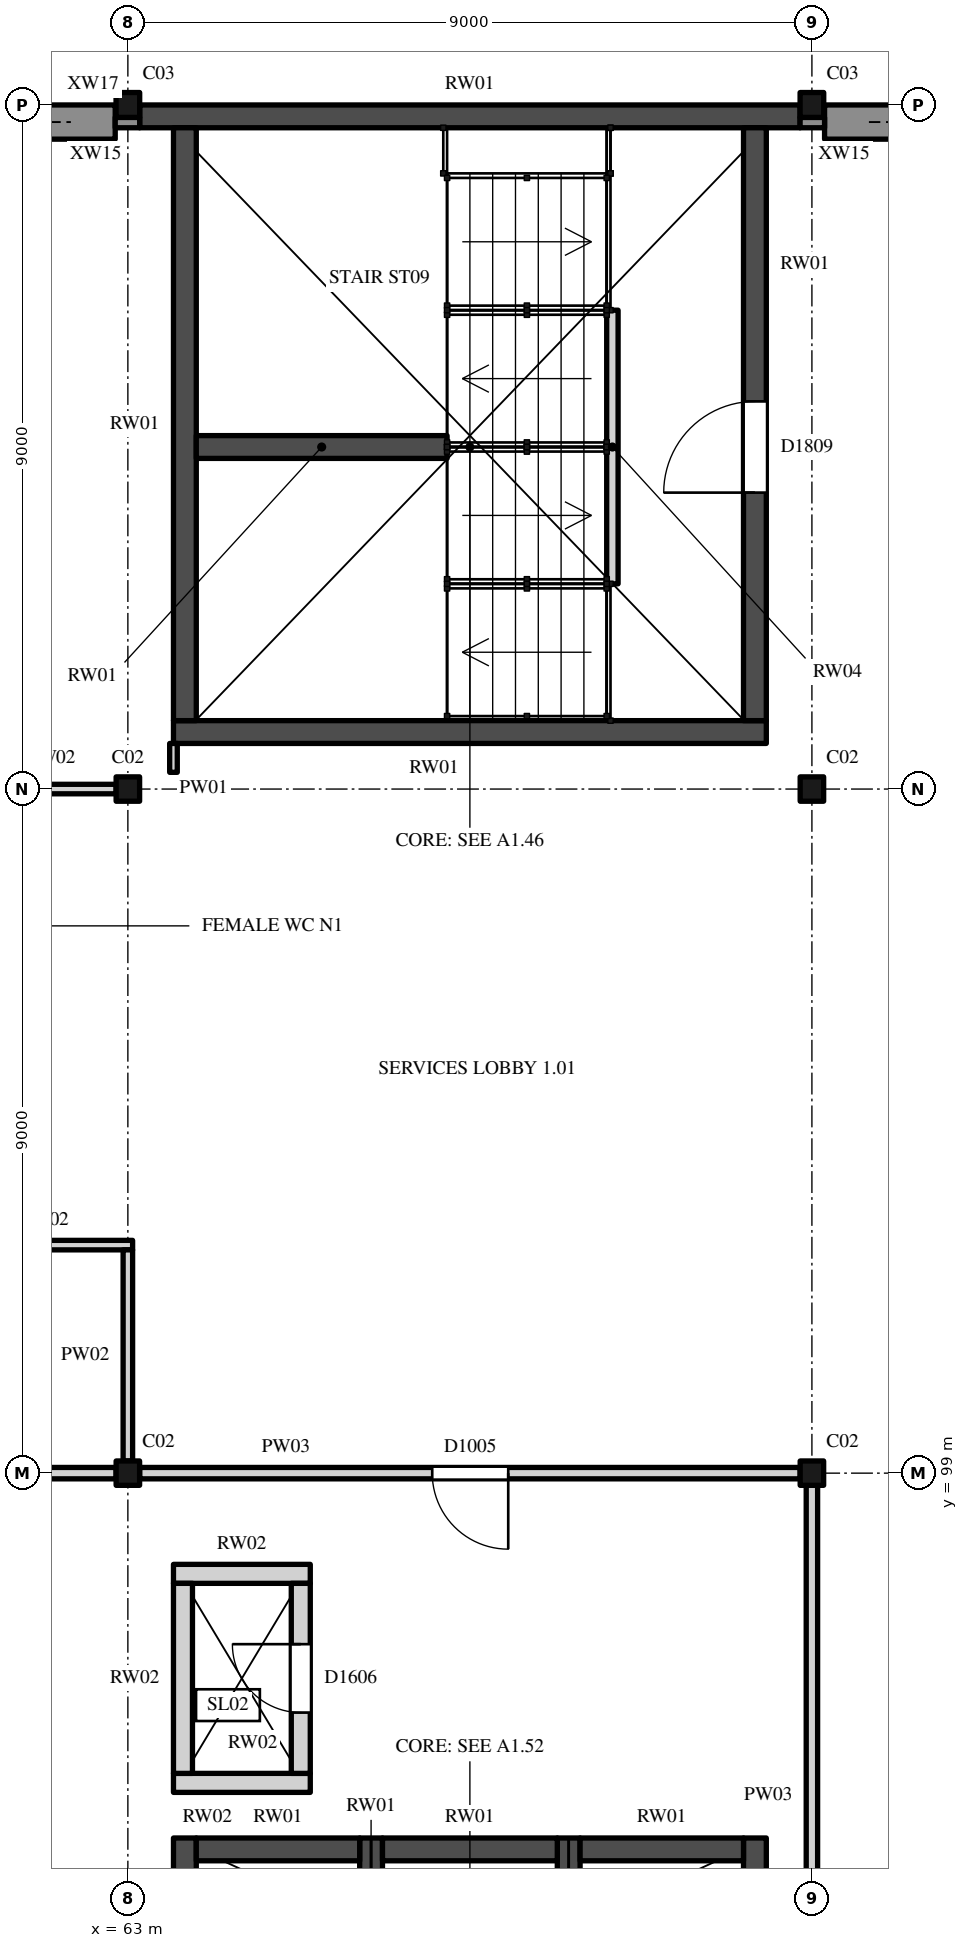
"""IFC4 building model, lengths in metres.
Left out: names, types, materials, properties, quantities, classifications, styles, units other than length and angle.
Written with IfcOpenShell. Run it as: python <this file> out.ifc"""

import sys

from ifc_helpers import new_model, si_unit, direction, frame, frame_2d, origin, origin_2d, place, context, subcontext, project, spatial, rectangle, i_section, extrude, element, fill, save


model = new_model("IFC4")
c1 = context("Model", 3, precision=1e-05, world=origin(), true_north=direction((0.0, 1.0)))
c2 = subcontext(c1, "Body", "Model", "MODEL_VIEW")
j1 = project(units=[si_unit("LENGTHUNIT", "METRE"), si_unit("PLANEANGLEUNIT", "RADIAN")], contexts=[c1])
p1 = place(None, origin())
s1 = spatial("IfcSite", under=j1, at=p1, CompositionType="ELEMENT")
p2 = place(p1, origin())
s2 = spatial("IfcBuilding", under=s1, at=p2, CompositionType="ELEMENT")
p3 = place(p2, frame((0.0, 0.0, 6.0)))
s3 = spatial("IfcBuildingStorey", under=s2, at=p3, CompositionType="ELEMENT", Elevation=6.0)
for number, where, z_axis, x_axis in (
    (1, (63.0, 99.0, 0.0), (0.0, 0.0, 1.0), (1.0, 0.0, 0.0)),
    (2, (72.0, 99.0, 0.0), (0.0, 0.0, 1.0), (1.0, 0.0, 0.0)),
    (3, (63.0, 108.0, 0.0), (0.0, 0.0, 1.0), (1.0, 0.0, 0.0)),
    (4, (72.0, 108.0, 0.0), (0.0, 0.0, 1.0), (1.0, 0.0, 0.0)),
):
    element("IfcColumn", number, at=place(p3, frame(where, z_axis=z_axis, x_axis=x_axis)), inside=s3, PredefinedType="COLUMN", context=c2, shape_type="SweptSolid", body=[
        extrude(i_section(OverallWidth=0.309, OverallDepth=0.321, WebThickness=0.014, FlangeThickness=0.022, FilletRadius=0.017, at=origin_2d()), origin(), (0.0, 0.0, 1.0), 5.0),
    ])
for number, where, z_axis, x_axis in (
    (5, (63.0, 117.0, 0.0), (0.0, 0.0, 1.0), (1.0, 0.0, 0.0)),
    (6, (72.0, 117.0, 0.0), (0.0, 0.0, 1.0), (1.0, 0.0, 0.0)),
):
    element("IfcColumn", number, at=place(p3, frame(where, z_axis=z_axis, x_axis=x_axis)), inside=s3, PredefinedType="COLUMN", context=c2, shape_type="SweptSolid", body=[
        extrude(i_section(OverallWidth=0.311, OverallDepth=0.327, WebThickness=0.016, FlangeThickness=0.025, FilletRadius=0.017, at=origin_2d()), origin(), (0.0, 0.0, 1.0), 5.0),
    ])
p4 = place(p3, frame((63.6, 108.75, 0.0), z_axis=(0.0, 0.0, 1.0), x_axis=(1.0, 0.0, 0.0)))
e7 = element("IfcWall", 7, at=p4, inside=s3, PredefinedType="SHEAR", context=c2, shape_type="SweptSolid", body=[
    extrude(rectangle(XDim=7.8, YDim=0.3, at=frame_2d((3.9, 0.0))), origin(), (0.0, 0.0, 1.0), 5.0),
])
p5 = place(p3, frame((63.156, 116.85, 0.0), z_axis=(0.0, 0.0, 1.0), x_axis=(1.0, 0.0, 0.0)))
e8 = element("IfcWall", 8, at=p5, inside=s3, PredefinedType="SHEAR", context=c2, shape_type="SweptSolid", body=[
    extrude(rectangle(XDim=8.689, YDim=0.3, at=frame_2d((4.344, 0.0))), origin(), (0.0, 0.0, 1.0), 5.0),
])
p6 = place(p3, frame((63.75, 108.9, 0.0), z_axis=(0.0, 0.0, 1.0), x_axis=(0.0, 1.0, 0.0)))
e9 = element("IfcWall", 9, at=p6, inside=s3, PredefinedType="SHEAR", context=c2, shape_type="SweptSolid", body=[
    extrude(rectangle(XDim=7.8, YDim=0.3, at=frame_2d((3.9, 0.0))), origin(), (0.0, 0.0, 1.0), 5.0),
])
p7 = place(p3, frame((71.25, 108.9, 0.0), z_axis=(0.0, 0.0, 1.0), x_axis=(0.0, 1.0, 0.0)))
e10 = element("IfcWall", 10, at=p7, inside=s3, PredefinedType="SHEAR", context=c2, shape_type="SweptSolid", body=[
    extrude(rectangle(XDim=7.8, YDim=0.3, at=frame_2d((3.9, 0.0))), origin(), (0.0, 0.0, 1.0), 5.0),
])
p8 = place(p7, frame((3.0, 0.0, 0.0)))
e11 = element("IfcOpeningElement", 11, at=p8, cuts=e10, PredefinedType="OPENING", context=c2, shape_type="SweptSolid", body=[
    extrude(rectangle(XDim=1.2, YDim=2.1, at=frame_2d((0.6, 1.05))), frame((0.0, 0.16, 0.0), z_axis=(0.0, -1.0, 0.0), x_axis=(1.0, 0.0, 0.0)), (0.0, 0.0, 1.0), 0.32),
])
p9 = place(p3, frame((67.2, 112.5, 0.0), z_axis=(0.0, 0.0, 1.0), x_axis=(-1.0, 0.0, 0.0)))
e12 = element("IfcWall", 12, at=p9, inside=s3, PredefinedType="SHEAR", context=c2, shape_type="SweptSolid", body=[
    extrude(rectangle(XDim=3.3, YDim=0.3, at=frame_2d((1.65, 0.0))), origin(), (0.0, 0.0, 1.0), 5.0),
])
p10 = place(p3, frame((69.375, 110.7, 0.0), z_axis=(0.0, 0.0, 1.0), x_axis=(0.0, 1.0, 0.0)))
e13 = element("IfcWall", 13, at=p10, inside=s3, PredefinedType="STANDARD", context=c2, shape_type="SweptSolid", body=[
    extrude(rectangle(XDim=3.6, YDim=0.15, at=frame_2d((1.8, 0.0))), origin(), (0.0, 0.0, 1.0), 2.3),
])
for number, where, z_axis, x_axis in (
    (14, (63.75, 90.6, 0.0), (0.0, 0.0, 1.0), (0.0, 1.0, 0.0)),
    (15, (66.2, 90.6, 0.0), (0.0, 0.0, 1.0), (0.0, 1.0, 0.0)),
    (16, (68.8, 90.6, 0.0), (0.0, 0.0, 1.0), (0.0, 1.0, 0.0)),
    (17, (71.25, 90.6, 0.0), (0.0, 0.0, 1.0), (0.0, 1.0, 0.0)),
):
    element("IfcWall", number, at=place(p3, frame(where, z_axis=z_axis, x_axis=x_axis)), inside=s3, PredefinedType="SHEAR", context=c2, shape_type="SweptSolid", body=[
        extrude(rectangle(XDim=3.6, YDim=0.3, at=frame_2d((1.8, 0.0))), origin(), (0.0, 0.0, 1.0), 5.0),
    ])
p11 = place(p3, frame((63.9, 94.05, 0.0), z_axis=(0.0, 0.0, 1.0), x_axis=(1.0, 0.0, 0.0)))
e18 = element("IfcWall", 18, at=p11, inside=s3, PredefinedType="SHEAR", context=c2, shape_type="SweptSolid", body=[
    extrude(rectangle(XDim=2.15, YDim=0.3, at=frame_2d((1.075, 0.0))), origin(), (0.0, 0.0, 1.0), 5.0),
])
p12 = place(p3, frame((66.35, 94.05, 0.0), z_axis=(0.0, 0.0, 1.0), x_axis=(1.0, 0.0, 0.0)))
e19 = element("IfcWall", 19, at=p12, inside=s3, PredefinedType="SHEAR", context=c2, shape_type="SweptSolid", body=[
    extrude(rectangle(XDim=2.3, YDim=0.3, at=frame_2d((1.15, 0.0))), origin(), (0.0, 0.0, 1.0), 5.0),
])
p13 = place(p3, frame((68.95, 94.05, 0.0), z_axis=(0.0, 0.0, 1.0), x_axis=(1.0, 0.0, 0.0)))
e20 = element("IfcWall", 20, at=p13, inside=s3, PredefinedType="SHEAR", context=c2, shape_type="SweptSolid", body=[
    extrude(rectangle(XDim=2.15, YDim=0.3, at=frame_2d((1.075, 0.0))), origin(), (0.0, 0.0, 1.0), 5.0),
])
for number, where, z_axis, x_axis in (
    (21, (63.6, 94.925, 0.0), (0.0, 0.0, 1.0), (1.0, 0.0, 0.0)),
    (22, (63.6, 97.675, 0.0), (0.0, 0.0, 1.0), (1.0, 0.0, 0.0)),
):
    element("IfcWall", number, at=place(p3, frame(where, z_axis=z_axis, x_axis=x_axis)), inside=s3, PredefinedType="STANDARD", context=c2, shape_type="SweptSolid", body=[
        extrude(rectangle(XDim=1.8, YDim=0.25, at=frame_2d((0.9, 0.0))), origin(), (0.0, 0.0, 1.0), 5.0),
    ])
p14 = place(p3, frame((63.725, 95.05, 0.0), z_axis=(0.0, 0.0, 1.0), x_axis=(0.0, 1.0, 0.0)))
e23 = element("IfcWall", 23, at=p14, inside=s3, PredefinedType="STANDARD", context=c2, shape_type="SweptSolid", body=[
    extrude(rectangle(XDim=2.5, YDim=0.25, at=frame_2d((1.25, 0.0))), origin(), (0.0, 0.0, 1.0), 5.0),
])
p15 = place(p3, frame((65.275, 95.05, 0.0), z_axis=(0.0, 0.0, 1.0), x_axis=(0.0, 1.0, 0.0)))
e24 = element("IfcWall", 24, at=p15, inside=s3, PredefinedType="STANDARD", context=c2, shape_type="SweptSolid", body=[
    extrude(rectangle(XDim=2.5, YDim=0.25, at=frame_2d((1.25, 0.0))), origin(), (0.0, 0.0, 1.0), 5.0),
])
p16 = place(p15, frame((0.8, 0.0, 0.0)))
e25 = element("IfcOpeningElement", 25, at=p16, cuts=e24, PredefinedType="OPENING", context=c2, shape_type="SweptSolid", body=[
    extrude(rectangle(XDim=0.9, YDim=2.1, at=frame_2d((0.45, 1.05))), frame((0.0, 0.135, 0.0), z_axis=(0.0, -1.0, 0.0), x_axis=(1.0, 0.0, 0.0)), (0.0, 0.0, 1.0), 0.27),
])
p17 = place(p3, frame((54.156, 116.775, 0.0), z_axis=(0.0, 0.0, 1.0), x_axis=(1.0, 0.0, 0.0)))
e26 = element("IfcWall", 26, at=p17, inside=s3, PredefinedType="SOLIDWALL", context=c2, shape_type="SweptSolid", body=[
    extrude(rectangle(XDim=8.678, YDim=0.45, at=frame_2d((4.339, 0.0))), origin(), (0.0, 0.0, 1.0), 4.466),
])
p18 = place(p17, frame((0.594, 0.0, 1.6)))
e27 = element("IfcOpeningElement", 27, at=p18, cuts=e26, PredefinedType="OPENING", context=c2, shape_type="SweptSolid", body=[
    extrude(rectangle(XDim=7.5, YDim=1.2, at=frame_2d((3.75, 0.6))), frame((0.0, 0.235, 0.0), z_axis=(0.0, -1.0, 0.0), x_axis=(1.0, 0.0, 0.0)), (0.0, 0.0, 1.0), 0.47),
])
p19 = place(p3, frame((72.167, 116.775, 0.0), z_axis=(0.0, 0.0, 1.0), x_axis=(1.0, 0.0, 0.0)))
e28 = element("IfcWall", 28, at=p19, inside=s3, PredefinedType="SOLIDWALL", context=c2, shape_type="SweptSolid", body=[
    extrude(rectangle(XDim=8.673, YDim=0.45, at=frame_2d((4.336, 0.0))), origin(), (0.0, 0.0, 1.0), 4.466),
])
p20 = place(p19, frame((0.583, 0.0, 1.6)))
e29 = element("IfcOpeningElement", 29, at=p20, cuts=e28, PredefinedType="OPENING", context=c2, shape_type="SweptSolid", body=[
    extrude(rectangle(XDim=7.5, YDim=1.2, at=frame_2d((3.75, 0.6))), frame((0.0, 0.235, 0.0), z_axis=(0.0, -1.0, 0.0), x_axis=(1.0, 0.0, 0.0)), (0.0, 0.0, 1.0), 0.47),
])
for number, where, z_axis, x_axis in (
    (30, (62.833, 116.768, 0.0), (0.0, 0.0, 1.0), (1.0, 0.0, 0.0)),
    (31, (71.844, 116.768, 0.0), (0.0, 0.0, 1.0), (1.0, 0.0, 0.0)),
):
    element("IfcWall", number, at=place(p3, frame(where, z_axis=z_axis, x_axis=x_axis)), inside=s3, PredefinedType="SOLIDWALL", context=c2, shape_type="SweptSolid", body=[
        extrude(rectangle(XDim=0.322, YDim=0.136, at=frame_2d((0.161, 0.0))), origin(), (0.0, 0.0, 1.0), 5.0),
    ])
p21 = place(p3, frame((54.45, 99.0, 0.0), z_axis=(0.0, 0.0, 1.0), x_axis=(1.0, 0.0, 0.0)))
e32 = element("IfcWall", 32, at=p21, inside=s3, PredefinedType="PARTITIONING", context=c2, shape_type="SweptSolid", body=[
    extrude(rectangle(XDim=8.396, YDim=0.15, at=frame_2d((4.198, 0.0))), origin(), (0.0, 0.0, 1.0), 4.466),
])
p22 = place(p3, frame((63.155, 99.0, 0.0), z_axis=(0.0, 0.0, 1.0), x_axis=(1.0, 0.0, 0.0)))
e33 = element("IfcWall", 33, at=p22, inside=s3, PredefinedType="PARTITIONING", context=c2, shape_type="SweptSolid", body=[
    extrude(rectangle(XDim=8.691, YDim=0.15, at=frame_2d((4.345, 0.0))), origin(), (0.0, 0.0, 1.0), 4.466),
])
p23 = place(p22, frame((3.85, 0.0, 0.0)))
e34 = element("IfcOpeningElement", 34, at=p23, cuts=e33, PredefinedType="OPENING", context=c2, shape_type="SweptSolid", body=[
    extrude(rectangle(XDim=1.0, YDim=2.4, at=frame_2d((0.5, 1.2))), frame((0.0, 0.085, 0.0), z_axis=(0.0, -1.0, 0.0), x_axis=(1.0, 0.0, 0.0)), (0.0, 0.0, 1.0), 0.17),
])
p24 = place(p3, frame((54.45, 102.0, 0.0), z_axis=(0.0, 0.0, 1.0), x_axis=(1.0, 0.0, 0.0)))
e35 = element("IfcWall", 35, at=p24, inside=s3, PredefinedType="PARTITIONING", context=c2, shape_type="SweptSolid", body=[
    extrude(rectangle(XDim=8.613, YDim=0.125, at=frame_2d((4.306, 0.0))), origin(), (0.0, 0.0, 1.0), 4.473),
])
p25 = place(p24, frame((1.15, 0.0, 0.0)))
e36 = element("IfcOpeningElement", 36, at=p25, cuts=e35, PredefinedType="OPENING", context=c2, shape_type="SweptSolid", body=[
    extrude(rectangle(XDim=0.9, YDim=2.1, at=frame_2d((0.45, 1.05))), frame((0.0, 0.073, 0.0), z_axis=(0.0, -1.0, 0.0), x_axis=(1.0, 0.0, 0.0)), (0.0, 0.0, 1.0), 0.145),
])
p26 = place(p24, frame((5.4, 0.0, 0.0)))
e37 = element("IfcOpeningElement", 37, at=p26, cuts=e35, PredefinedType="OPENING", context=c2, shape_type="SweptSolid", body=[
    extrude(rectangle(XDim=0.9, YDim=2.1, at=frame_2d((0.45, 1.05))), frame((0.0, 0.073, 0.0), z_axis=(0.0, -1.0, 0.0), x_axis=(1.0, 0.0, 0.0)), (0.0, 0.0, 1.0), 0.145),
])
p27 = place(p3, frame((54.45, 108.0, 0.0), z_axis=(0.0, 0.0, 1.0), x_axis=(1.0, 0.0, 0.0)))
e38 = element("IfcWall", 38, at=p27, inside=s3, PredefinedType="PARTITIONING", context=c2, shape_type="SweptSolid", body=[
    extrude(rectangle(XDim=8.396, YDim=0.125, at=frame_2d((4.198, 0.0))), origin(), (0.0, 0.0, 1.0), 4.466),
])
p28 = place(p27, frame((6.5, 0.0, 0.0)))
e39 = element("IfcOpeningElement", 39, at=p28, cuts=e38, PredefinedType="OPENING", context=c2, shape_type="SweptSolid", body=[
    extrude(rectangle(XDim=1.0, YDim=2.1, at=frame_2d((0.5, 1.05))), frame((0.0, 0.073, 0.0), z_axis=(0.0, -1.0, 0.0), x_axis=(1.0, 0.0, 0.0)), (0.0, 0.0, 1.0), 0.145),
])
p29 = place(p3, frame((63.0, 99.16, 0.0), z_axis=(0.0, 0.0, 1.0), x_axis=(0.0, 1.0, 0.0)))
e40 = element("IfcWall", 40, at=p29, inside=s3, PredefinedType="PARTITIONING", context=c2, shape_type="SweptSolid", body=[
    extrude(rectangle(XDim=2.777, YDim=0.125, at=frame_2d((1.389, 0.0))), origin(), (0.0, 0.0, 1.0), 4.365),
])
p30 = place(p3, frame((63.6, 108.22, 0.0), z_axis=(0.0, 0.0, 1.0), x_axis=(0.0, 1.0, 0.0)))
e41 = element("IfcWall", 41, at=p30, inside=s3, PredefinedType="PARTITIONING", context=c2, shape_type="SweptSolid", body=[
    extrude(rectangle(XDim=0.38, YDim=0.1, at=frame_2d((0.19, 0.0))), origin(), (0.0, 0.0, 1.0), 4.825),
])
p31 = place(p3, frame((72.0, 90.675, 0.0), z_axis=(0.0, 0.0, 1.0), x_axis=(0.0, 1.0, 0.0)))
e42 = element("IfcWall", 42, at=p31, inside=s3, PredefinedType="PARTITIONING", context=c2, shape_type="SweptSolid", body=[
    extrude(rectangle(XDim=8.165, YDim=0.15, at=frame_2d((4.082, 0.0))), origin(), (0.0, 0.0, 1.0), 4.365),
])
p32 = place(p8, origin())
e43 = element("IfcDoor", 43, at=p32, inside=s3, OperationType="SINGLE_SWING_RIGHT", PredefinedType="DOOR", context=c2, shape_type="SweptSolid", body=[
    extrude(rectangle(XDim=1.2, YDim=2.1, at=frame_2d((0.6, 1.05))), frame((0.0, 0.025, 0.0), z_axis=(0.0, -1.0, 0.0), x_axis=(1.0, 0.0, 0.0)), (0.0, 0.0, 1.0), 0.05),
])
fill(e11, e43)
p33 = place(p16, origin())
e44 = element("IfcDoor", 44, at=p33, inside=s3, OperationType="SINGLE_SWING_LEFT", PredefinedType="DOOR", context=c2, shape_type="SweptSolid", body=[
    extrude(rectangle(XDim=0.9, YDim=2.1, at=frame_2d((0.45, 1.05))), frame((0.0, 0.025, 0.0), z_axis=(0.0, -1.0, 0.0), x_axis=(1.0, 0.0, 0.0)), (0.0, 0.0, 1.0), 0.05),
])
fill(e25, e44)
p34 = place(p18, origin())
e45 = element("IfcWindow", 45, at=p34, inside=s3, PartitioningType="SINGLE_PANEL", PredefinedType="WINDOW", context=c2, shape_type="SweptSolid", body=[
    extrude(rectangle(XDim=7.5, YDim=1.2, at=frame_2d((3.75, 0.6))), frame((0.0, 0.03, 0.0), z_axis=(0.0, -1.0, 0.0), x_axis=(1.0, 0.0, 0.0)), (0.0, 0.0, 1.0), 0.06),
])
fill(e27, e45)
p35 = place(p20, origin())
e46 = element("IfcWindow", 46, at=p35, inside=s3, PartitioningType="SINGLE_PANEL", PredefinedType="WINDOW", context=c2, shape_type="SweptSolid", body=[
    extrude(rectangle(XDim=7.5, YDim=1.2, at=frame_2d((3.75, 0.6))), frame((0.0, 0.03, 0.0), z_axis=(0.0, -1.0, 0.0), x_axis=(1.0, 0.0, 0.0)), (0.0, 0.0, 1.0), 0.06),
])
fill(e29, e46)
p36 = place(p23, origin())
e47 = element("IfcDoor", 47, at=p36, inside=s3, OperationType="SINGLE_SWING_RIGHT", PredefinedType="DOOR", context=c2, shape_type="SweptSolid", body=[
    extrude(rectangle(XDim=1.0, YDim=2.4, at=frame_2d((0.5, 1.2))), frame((0.0, 0.025, 0.0), z_axis=(0.0, -1.0, 0.0), x_axis=(1.0, 0.0, 0.0)), (0.0, 0.0, 1.0), 0.05),
])
fill(e34, e47)
save(model, sys.argv[1])
